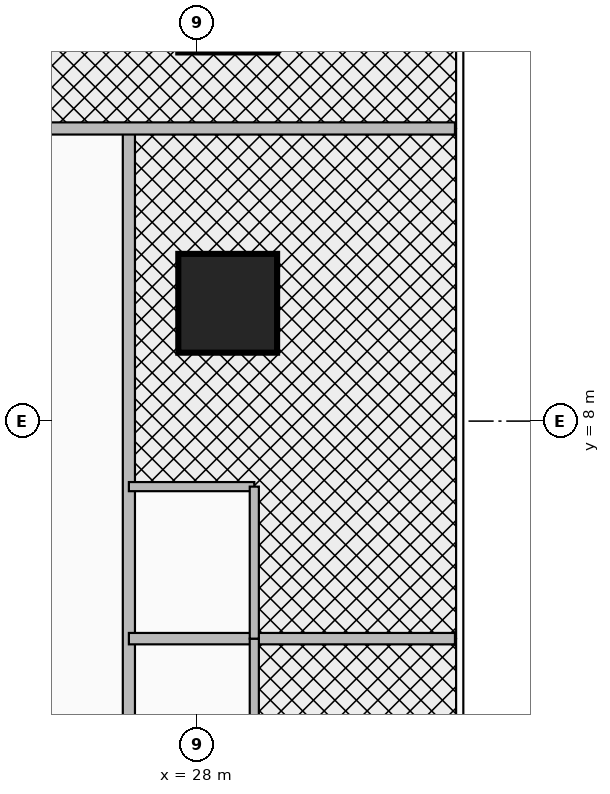
"""IFC4 building model, lengths in metres.
Left out: names, types, materials, properties, quantities, classifications, styles, units other than length and angle.
Written with IfcOpenShell. Run it as: python <this file> out.ifc"""

import sys

from ifc_helpers import new_model, si_unit, direction, frame, frame_2d, origin, origin_2d, place, context, subcontext, project, spatial, rectangle, circle, extrude, source, transform, mapped, element, fill, save


model = new_model("IFC4")
c1 = context("Model", 3, precision=1e-05, world=origin(), true_north=direction((0.0, 1.0)))
c2 = subcontext(c1, "Body", "Model", "MODEL_VIEW")
j1 = project(units=[si_unit("LENGTHUNIT", "METRE"), si_unit("PLANEANGLEUNIT", "RADIAN")], contexts=[c1])
p1 = place(None, origin())
s1 = spatial("IfcSite", under=j1, at=p1, CompositionType="ELEMENT")
p2 = place(p1, origin())
s2 = spatial("IfcBuilding", under=s1, at=p2, CompositionType="ELEMENT")
p3 = place(p2, frame((0.0, 0.0, 26.0)))
s3 = spatial("IfcBuildingStorey", under=s2, at=p3, CompositionType="ELEMENT", Elevation=26.0)
m1 = source(origin(), c2, "Body", "SweptSolid", [
    extrude(circle(Radius=0.65, at=origin_2d()), origin(), (0.0, 0.0, 1.0), 3.7),
])
p4 = place(p3, frame((28.4, 9.55, 0.0), z_axis=(0.0, 0.0, 1.0), x_axis=(1.0, 0.0, 0.0)))
e1 = element("IfcColumn", 1, at=p4, inside=s3, PredefinedType="COLUMN", context=c2, shape_type="MappedRepresentation", body=[
    mapped(m1, transform((0.0, 0.0, 0.0), x_axis=(1.0, 0.0, 0.0), y_axis=(0.0, 1.0, 0.0), z_axis=(0.0, 0.0, 1.0), scale=1.0)),
])
p5 = place(p3, frame((27.1, -13.89, 0.0), z_axis=(0.0, 0.0, 1.0), x_axis=(0.0, 1.0, 0.0)))
e2 = element("IfcWall", 2, at=p5, inside=s3, PredefinedType="PARTITIONING", context=c2, shape_type="SweptSolid", body=[
    extrude(rectangle(XDim=25.74, YDim=0.16, at=frame_2d((12.87, 0.0))), origin(), (0.0, 0.0, 1.0), 2.583),
])
p6 = place(p5, frame((2.62, 0.0, 0.0)))
e3 = element("IfcOpeningElement", 3, at=p6, cuts=e2, PredefinedType="OPENING", context=c2, shape_type="SweptSolid", body=[
    extrude(rectangle(XDim=0.95, YDim=2.15, at=frame_2d((0.475, 1.075))), frame((0.0, 0.095, 0.0), z_axis=(0.0, -1.0, 0.0), x_axis=(1.0, 0.0, 0.0)), (0.0, 0.0, 1.0), 0.19),
])
p7 = place(p5, frame((8.484, 0.0, 0.0)))
e4 = element("IfcOpeningElement", 4, at=p7, cuts=e2, PredefinedType="OPENING", context=c2, shape_type="SweptSolid", body=[
    extrude(rectangle(XDim=0.95, YDim=2.15, at=frame_2d((0.475, 1.075))), frame((0.0, 0.095, 0.0), z_axis=(0.0, -1.0, 0.0), x_axis=(1.0, 0.0, 0.0)), (0.0, 0.0, 1.0), 0.19),
])
p8 = place(p5, frame((14.197, 0.0, 0.0)))
e5 = element("IfcOpeningElement", 5, at=p8, cuts=e2, PredefinedType="OPENING", context=c2, shape_type="SweptSolid", body=[
    extrude(rectangle(XDim=0.95, YDim=2.15, at=frame_2d((0.475, 1.075))), frame((0.0, 0.095, 0.0), z_axis=(0.0, -1.0, 0.0), x_axis=(1.0, 0.0, 0.0)), (0.0, 0.0, 1.0), 0.19),
])
p9 = place(p5, frame((21.648, 0.0, 0.0)))
e6 = element("IfcOpeningElement", 6, at=p9, cuts=e2, PredefinedType="OPENING", context=c2, shape_type="SweptSolid", body=[
    extrude(rectangle(XDim=0.95, YDim=2.15, at=frame_2d((0.475, 1.075))), frame((0.0, 0.095, 0.0), z_axis=(0.0, -1.0, 0.0), x_axis=(1.0, 0.0, 0.0)), (0.0, 0.0, 1.0), 0.19),
])
p10 = place(p3, frame((25.6, 11.85, 0.0), z_axis=(0.0, 0.0, 1.0), x_axis=(1.0, 0.0, 0.0)))
e7 = element("IfcWall", 7, at=p10, inside=s3, PredefinedType="PARTITIONING", context=c2, shape_type="SweptSolid", body=[
    extrude(rectangle(XDim=5.79, YDim=0.16, at=frame_2d((2.895, 0.0))), origin(), (0.0, 0.0, 1.0), 2.896),
])
p11 = place(p10, frame((0.3, 0.0, 0.0)))
e8 = element("IfcOpeningElement", 8, at=p11, cuts=e7, PredefinedType="OPENING", context=c2, shape_type="SweptSolid", body=[
    extrude(rectangle(XDim=0.9, YDim=2.1, at=frame_2d((0.45, 1.05))), frame((0.0, 0.095, 0.0), z_axis=(0.0, -1.0, 0.0), x_axis=(1.0, 0.0, 0.0)), (0.0, 0.0, 1.0), 0.19),
])
p12 = place(p3, frame((27.1, 5.138, 0.0), z_axis=(0.0, 0.0, 1.0), x_axis=(1.0, 0.0, 0.0)))
e9 = element("IfcWall", 9, at=p12, inside=s3, PredefinedType="PARTITIONING", context=c2, shape_type="SweptSolid", body=[
    extrude(rectangle(XDim=4.29, YDim=0.15, at=frame_2d((2.145, 0.0))), origin(), (0.0, 0.0, 1.0), 2.896),
])
p13 = place(p3, frame((28.75, 3.138, 0.0), z_axis=(0.0, 0.0, 1.0), x_axis=(0.0, 1.0, 0.0)))
e10 = element("IfcWall", 10, at=p13, inside=s3, PredefinedType="PARTITIONING", context=c2, shape_type="SweptSolid", body=[
    extrude(rectangle(XDim=2.0, YDim=0.12, at=frame_2d((1.0, 0.0))), origin(), (0.0, 0.0, 1.0), 3.46),
])
p14 = place(p13, frame((0.575, 0.0, 0.0)))
e11 = element("IfcOpeningElement", 11, at=p14, cuts=e10, PredefinedType="OPENING", context=c2, shape_type="SweptSolid", body=[
    extrude(rectangle(XDim=0.85, YDim=2.1, at=frame_2d((0.425, 1.05))), frame((0.0, 0.075, 0.0), z_axis=(0.0, -1.0, 0.0), x_axis=(1.0, 0.0, 0.0)), (0.0, 0.0, 1.0), 0.15),
])
p15 = place(p3, frame((27.1, 7.138, 0.0), z_axis=(0.0, 0.0, 1.0), x_axis=(1.0, 0.0, 0.0)))
e12 = element("IfcWall", 12, at=p15, inside=s3, PredefinedType="PARTITIONING", context=c2, shape_type="SweptSolid", body=[
    extrude(rectangle(XDim=1.65, YDim=0.12, at=frame_2d((0.825, 0.0))), origin(), (0.0, 0.0, 1.0), 2.896),
])
p16 = place(p3, frame((28.75, 5.138, 0.0), z_axis=(0.0, 0.0, 1.0), x_axis=(0.0, 1.0, 0.0)))
e13 = element("IfcWall", 13, at=p16, inside=s3, PredefinedType="PARTITIONING", context=c2, shape_type="SweptSolid", body=[
    extrude(rectangle(XDim=2.0, YDim=0.12, at=frame_2d((1.0, 0.0))), origin(), (0.0, 0.0, 1.0), 3.46),
])
p17 = place(p16, frame((0.575, 0.0, 0.0)))
e14 = element("IfcOpeningElement", 14, at=p17, cuts=e13, PredefinedType="OPENING", context=c2, shape_type="SweptSolid", body=[
    extrude(rectangle(XDim=0.85, YDim=2.1, at=frame_2d((0.425, 1.05))), frame((0.0, 0.075, 0.0), z_axis=(0.0, -1.0, 0.0), x_axis=(1.0, 0.0, 0.0)), (0.0, 0.0, 1.0), 0.15),
])
p18 = place(p11, origin())
e15 = element("IfcDoor", 15, at=p18, inside=s3, OperationType="SINGLE_SWING_LEFT", PredefinedType="DOOR", context=c2, shape_type="SweptSolid", body=[
    extrude(rectangle(XDim=0.9, YDim=2.1, at=frame_2d((0.45, 1.05))), frame((0.0, 0.025, 0.0), z_axis=(0.0, -1.0, 0.0), x_axis=(1.0, 0.0, 0.0)), (0.0, 0.0, 1.0), 0.05),
])
fill(e8, e15)
p19 = place(p14, origin())
e16 = element("IfcDoor", 16, at=p19, inside=s3, OperationType="SINGLE_SWING_LEFT", PredefinedType="DOOR", context=c2, shape_type="SweptSolid", body=[
    extrude(rectangle(XDim=0.85, YDim=2.1, at=frame_2d((0.425, 1.05))), frame((0.0, 0.025, 0.0), z_axis=(0.0, -1.0, 0.0), x_axis=(1.0, 0.0, 0.0)), (0.0, 0.0, 1.0), 0.05),
])
fill(e11, e16)
p20 = place(p9, origin())
e17 = element("IfcDoor", 17, at=p20, inside=s3, OperationType="SINGLE_SWING_RIGHT", PredefinedType="DOOR", context=c2, shape_type="SweptSolid", body=[
    extrude(rectangle(XDim=0.95, YDim=2.15, at=frame_2d((0.475, 1.075))), frame((0.0, 0.025, 0.0), z_axis=(0.0, -1.0, 0.0), x_axis=(1.0, 0.0, 0.0)), (0.0, 0.0, 1.0), 0.05),
])
fill(e6, e17)
p21 = place(p17, origin())
e18 = element("IfcDoor", 18, at=p21, inside=s3, OperationType="SINGLE_SWING_LEFT", PredefinedType="DOOR", context=c2, shape_type="SweptSolid", body=[
    extrude(rectangle(XDim=0.85, YDim=2.1, at=frame_2d((0.425, 1.05))), frame((0.0, 0.025, 0.0), z_axis=(0.0, -1.0, 0.0), x_axis=(1.0, 0.0, 0.0)), (0.0, 0.0, 1.0), 0.05),
])
fill(e14, e18)
save(model, sys.argv[1])
